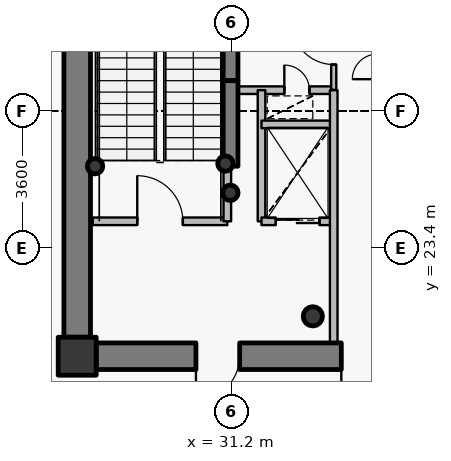
"""IFC4 building model, lengths in metres.
Left out: names, types, materials, properties, quantities, classifications, styles, units other than length and angle.
Written with IfcOpenShell. Run it as: python <this file> out.ifc"""

import sys

from ifc_helpers import new_model, si_unit, direction, frame, frame_2d, origin, origin_2d, place, context, subcontext, project, spatial, rectangle, hollow_circle, extrude, source, transform, mapped, element, fill, save


model = new_model("IFC4")
c1 = context("Model", 3, precision=1e-05, world=origin(), true_north=direction((0.0, 1.0)))
c2 = subcontext(c1, "Body", "Model", "MODEL_VIEW")
j1 = project(units=[si_unit("LENGTHUNIT", "METRE"), si_unit("PLANEANGLEUNIT", "RADIAN")], contexts=[c1])
p1 = place(None, origin())
s1 = spatial("IfcSite", under=j1, at=p1, CompositionType="ELEMENT")
p2 = place(p1, origin())
s2 = spatial("IfcBuilding", under=s1, at=p2, CompositionType="ELEMENT")
p3 = place(p2, frame((0.0, 0.0, 268.2)))
s3 = spatial("IfcBuildingStorey", under=s2, at=p3, CompositionType="ELEMENT", Elevation=268.2)
p4 = place(p3, frame((27.15, 20.55, 0.0), z_axis=(0.0, 0.0, 1.0), x_axis=(1.0, 0.0, 0.0)))
e1 = element("IfcColumn", 1, at=p4, inside=s3, PredefinedType="COLUMN", context=c2, shape_type="SweptSolid", body=[
    extrude(rectangle(XDim=1.0, YDim=1.0, at=origin_2d()), origin(), (0.0, 0.0, 1.0), 4.8),
])
p5 = place(p3, frame((33.35, 21.6, 0.0), z_axis=(0.0, 0.0, 1.0), x_axis=(1.0, 0.0, 0.0)))
e2 = element("IfcColumn", 2, at=p5, inside=s3, PredefinedType="COLUMN", context=c2, shape_type="SweptSolid", body=[
    extrude(hollow_circle(Radius=0.254, WallThickness=0.02, at=origin_2d()), origin(), (0.0, 0.0, 1.0), 4.8),
])
p6 = place(p3, frame((31.18, 27.8, 0.0), z_axis=(0.0, 0.0, 1.0), x_axis=(0.0, 1.0, 0.0)))
e3 = element("IfcWall", 3, at=p6, inside=s3, PredefinedType="SHEAR", context=c2, shape_type="SweptSolid", body=[
    extrude(rectangle(XDim=4.75, YDim=0.4, at=frame_2d((2.375, 0.0))), origin(), (0.0, 0.0, 1.0), 4.8),
])
for number, where, z_axis, x_axis in (
    (4, (31.05, 25.62, 0.0), (0.0, 0.0, 1.0), (1.0, 0.0, 0.0)),
    (5, (31.18, 24.85, 0.0), (0.0, 0.0, 1.0), (1.0, 0.0, 0.0)),
    (6, (27.62, 25.55, 0.0), (0.0, 0.0, 1.0), (1.0, 0.0, 0.0)),
):
    element("IfcColumn", number, at=place(p3, frame(where, z_axis=z_axis, x_axis=x_axis)), inside=s3, PredefinedType="COLUMN", context=c2, shape_type="SweptSolid", body=[
        extrude(hollow_circle(Radius=0.203, WallThickness=0.016, at=origin_2d()), origin(), (0.0, 0.0, 1.0), 4.8),
    ])
p7 = place(p3, frame((44.35, 20.55, 0.0), z_axis=(0.0, 0.0, 1.0), x_axis=(-1.0, 0.0, 0.0)))
e7 = element("IfcWall", 7, at=p7, inside=s3, PredefinedType="SHEAR", context=c2, shape_type="SweptSolid", body=[
    extrude(rectangle(XDim=16.7, YDim=0.7, at=frame_2d((8.35, 0.0))), origin(), (0.0, 0.0, 1.0), 4.1),
])
p8 = place(p7, frame((12.925, 0.0, 0.0)))
e8 = element("IfcOpeningElement", 8, at=p8, cuts=e7, PredefinedType="OPENING", context=c2, shape_type="SweptSolid", body=[
    extrude(rectangle(XDim=1.15, YDim=2.15, at=origin_2d()), frame((0.575, 0.36, 1.075), z_axis=(0.0, -1.0, 0.0), x_axis=(1.0, 0.0, 0.0)), (0.0, 0.0, 1.0), 0.72),
])
p9 = place(p7, frame((9.1, 0.0, 0.0)))
e9 = element("IfcOpeningElement", 9, at=p9, cuts=e7, PredefinedType="OPENING", context=c2, shape_type="SweptSolid", body=[
    extrude(rectangle(XDim=1.15, YDim=2.15, at=origin_2d()), frame((0.575, 0.36, 1.075), z_axis=(0.0, -1.0, 0.0), x_axis=(1.0, 0.0, 0.0)), (0.0, 0.0, 1.0), 0.72),
])
p10 = place(p3, frame((27.15, 21.05, 0.0), z_axis=(0.0, 0.0, 1.0), x_axis=(0.0, 1.0, 0.0)))
e10 = element("IfcWall", 10, at=p10, inside=s3, PredefinedType="SHEAR", context=c2, shape_type="SweptSolid", body=[
    extrude(rectangle(XDim=11.9, YDim=0.7, at=frame_2d((5.95, 0.0))), origin(), (0.0, 0.0, 1.0), 4.1),
])
p11 = place(p3, frame((31.18, 25.55, 0.0), z_axis=(0.0, 0.0, 1.0), x_axis=(0.0, 1.0, 0.0)))
e11 = element("IfcWall", 11, at=p11, inside=s3, PredefinedType="SHEAR", context=c2, shape_type="SweptSolid", body=[
    extrude(rectangle(XDim=2.25, YDim=0.4, at=frame_2d((1.125, 0.0))), origin(), (0.0, 0.0, 1.0), 4.15),
])
p12 = place(p3, frame((27.56, 24.1, 0.0), z_axis=(0.0, 0.0, 1.0), x_axis=(1.0, 0.0, 0.0)))
e12 = element("IfcWall", 12, at=p12, inside=s3, PredefinedType="PARTITIONING", context=c2, shape_type="SweptSolid", body=[
    extrude(rectangle(XDim=3.54, YDim=0.2, at=frame_2d((1.77, 0.0))), origin(), (0.0, 0.0, 1.0), 4.55),
])
p13 = place(p12, frame((1.17, 0.0, 0.0)))
e13 = element("IfcOpeningElement", 13, at=p13, cuts=e12, PredefinedType="OPENING", context=c2, shape_type="SweptSolid", body=[
    extrude(rectangle(XDim=1.2, YDim=2.15, at=origin_2d()), frame((0.6, 0.11, 1.075), z_axis=(0.0, -1.0, 0.0), x_axis=(1.0, 0.0, 0.0)), (0.0, 0.0, 1.0), 0.22),
])
p14 = place(p3, frame((31.1, 24.1, 0.0), z_axis=(0.0, 0.0, 1.0), x_axis=(0.0, 1.0, 0.0)))
e14 = element("IfcWall", 14, at=p14, inside=s3, PredefinedType="PARTITIONING", context=c2, shape_type="SweptSolid", body=[
    extrude(rectangle(XDim=1.44, YDim=0.2, at=frame_2d((0.72, 0.0))), origin(), (0.0, 0.0, 1.0), 4.55),
])
p15 = place(p3, frame((31.1, 27.55, 0.0), z_axis=(0.0, 0.0, 1.0), x_axis=(1.0, 0.0, 0.0)))
e15 = element("IfcWall", 15, at=p15, inside=s3, PredefinedType="PARTITIONING", context=c2, shape_type="SweptSolid", body=[
    extrude(rectangle(XDim=2.8, YDim=0.2, at=frame_2d((1.4, 0.0))), origin(), (0.0, 0.0, 1.0), 4.135),
])
p16 = place(p15, frame((1.5, 0.0, 0.0)))
e16 = element("IfcOpeningElement", 16, at=p16, cuts=e15, PredefinedType="OPENING", context=c2, shape_type="SweptSolid", body=[
    extrude(rectangle(XDim=0.66, YDim=2.05, at=origin_2d()), frame((0.33, 0.11, 1.025), z_axis=(0.0, -1.0, 0.0), x_axis=(1.0, 0.0, 0.0)), (0.0, 0.0, 1.0), 0.22),
])
p17 = place(p3, frame((32.0, 24.1, 0.0), z_axis=(0.0, 0.0, 1.0), x_axis=(0.0, 1.0, 0.0)))
e17 = element("IfcWall", 17, at=p17, inside=s3, PredefinedType="PARTITIONING", context=c2, shape_type="SweptSolid", body=[
    extrude(rectangle(XDim=3.45, YDim=0.2, at=frame_2d((1.725, 0.0))), origin(), (0.0, 0.0, 1.0), 4.55),
])
p18 = place(p3, frame((32.0, 24.1, 0.0), z_axis=(0.0, 0.0, 1.0), x_axis=(1.0, 0.0, 0.0)))
e18 = element("IfcWall", 18, at=p18, inside=s3, PredefinedType="PARTITIONING", context=c2, shape_type="SweptSolid", body=[
    extrude(rectangle(XDim=1.9, YDim=0.2, at=frame_2d((0.95, 0.0))), origin(), (0.0, 0.0, 1.0), 4.135),
])
p19 = place(p18, frame((0.375, 0.0, 0.0)))
e19 = element("IfcOpeningElement", 19, at=p19, cuts=e18, PredefinedType="OPENING", context=c2, shape_type="SweptSolid", body=[
    extrude(rectangle(XDim=1.15, YDim=2.15, at=origin_2d()), frame((0.575, 0.11, 1.075), z_axis=(0.0, -1.0, 0.0), x_axis=(1.0, 0.0, 0.0)), (0.0, 0.0, 1.0), 0.22),
])
p20 = place(p3, frame((32.0, 26.65, 0.0), z_axis=(0.0, 0.0, 1.0), x_axis=(1.0, 0.0, 0.0)))
e20 = element("IfcWall", 20, at=p20, inside=s3, PredefinedType="PARTITIONING", context=c2, shape_type="SweptSolid", body=[
    extrude(rectangle(XDim=1.9, YDim=0.2, at=frame_2d((0.95, 0.0))), origin(), (0.0, 0.0, 1.0), 4.135),
])
p21 = place(p3, frame((33.9, 20.9, 0.0), z_axis=(0.0, 0.0, 1.0), x_axis=(0.0, 1.0, 0.0)))
e21 = element("IfcWall", 21, at=p21, inside=s3, PredefinedType="PARTITIONING", context=c2, shape_type="SweptSolid", body=[
    extrude(rectangle(XDim=6.65, YDim=0.2, at=frame_2d((3.325, 0.0))), origin(), (0.0, 0.0, 1.0), 4.135),
])
p22 = place(p3, frame((33.9, 27.56, 0.0), z_axis=(0.0, 0.0, 1.0), x_axis=(0.0, 1.0, 0.0)))
e22 = element("IfcWall", 22, at=p22, inside=s3, PredefinedType="PARTITIONING", context=c2, shape_type="SweptSolid", body=[
    extrude(rectangle(XDim=5.54, YDim=0.135, at=frame_2d((2.77, 0.0))), origin(), (0.0, 0.0, 1.0), 4.135),
])
p23 = place(p22, frame((0.665, 0.0, 0.0)))
e23 = element("IfcOpeningElement", 23, at=p23, cuts=e22, PredefinedType="OPENING", context=c2, shape_type="SweptSolid", body=[
    extrude(rectangle(XDim=1.1, YDim=2.15, at=origin_2d()), frame((0.55, 0.078, 1.075), z_axis=(0.0, -1.0, 0.0), x_axis=(1.0, 0.0, 0.0)), (0.0, 0.0, 1.0), 0.155),
])
p24 = place(p22, frame((3.117, 0.0, 0.0)))
e24 = element("IfcOpeningElement", 24, at=p24, cuts=e22, PredefinedType="OPENING", context=c2, shape_type="SweptSolid", body=[
    extrude(rectangle(XDim=1.1, YDim=2.15, at=origin_2d()), frame((0.55, 0.078, 1.075), z_axis=(0.0, -1.0, 0.0), x_axis=(1.0, 0.0, 0.0)), (0.0, 0.0, 1.0), 0.155),
])
p25 = place(p3, frame((26.8, 21.04, 0.0), z_axis=(0.0, 0.0, 1.0), x_axis=(0.0, -1.0, 0.0)))
e25 = element("IfcWall", 25, at=p25, inside=s3, PredefinedType="PARTITIONING", context=c2, shape_type="SweptSolid", body=[
    extrude(rectangle(XDim=0.84, YDim=0.135, at=frame_2d((0.42, 0.0))), origin(), (0.0, 0.0, 1.0), 4.085),
])
p26 = place(p3, frame((27.107, 20.2, 0.0), z_axis=(0.0, 0.0, 1.0), x_axis=(1.0, 0.0, 0.0)))
e26 = element("IfcWall", 26, at=p26, inside=s3, PredefinedType="PARTITIONING", context=c2, shape_type="SweptSolid", body=[
    extrude(rectangle(XDim=0.532, YDim=0.135, at=frame_2d((0.266, 0.0))), origin(), (0.0, 0.0, 1.0), 4.085),
])
m1 = source(origin(), c2, "Body", "SweptSolid", [
    extrude(rectangle(XDim=1.15, YDim=2.15, at=origin_2d()), frame((0.575, 0.025, 1.075), z_axis=(0.0, -1.0, 0.0), x_axis=(1.0, 0.0, 0.0)), (0.0, 0.0, 1.0), 0.05),
])
p27 = place(p8, origin())
e27 = element("IfcDoor", 27, at=p27, inside=s3, OperationType="SINGLE_SWING_RIGHT", PredefinedType="DOOR", context=c2, shape_type="MappedRepresentation", body=[
    mapped(m1, transform((0.0, 0.0, 0.0), x_axis=(1.0, 0.0, 0.0), y_axis=(0.0, 1.0, 0.0), z_axis=(0.0, 0.0, 1.0), scale=1.0)),
])
fill(e8, e27)
p28 = place(p9, origin())
e28 = element("IfcDoor", 28, at=p28, inside=s3, OperationType="SINGLE_SWING_RIGHT", PredefinedType="DOOR", context=c2, shape_type="MappedRepresentation", body=[
    mapped(m1, transform((0.0, 0.0, 0.0), x_axis=(1.0, 0.0, 0.0), y_axis=(0.0, 1.0, 0.0), z_axis=(0.0, 0.0, 1.0), scale=1.0)),
])
fill(e9, e28)
m2 = source(origin(), c2, "Body", "SweptSolid", [
    extrude(rectangle(XDim=1.2, YDim=2.15, at=origin_2d()), frame((0.6, 0.025, 1.075), z_axis=(0.0, -1.0, 0.0), x_axis=(1.0, 0.0, 0.0)), (0.0, 0.0, 1.0), 0.05),
])
p29 = place(p13, origin())
e29 = element("IfcDoor", 29, at=p29, inside=s3, OperationType="SINGLE_SWING_LEFT", PredefinedType="DOOR", context=c2, shape_type="MappedRepresentation", body=[
    mapped(m2, transform((0.0, 0.0, 0.0), x_axis=(1.0, 0.0, 0.0), y_axis=(0.0, 1.0, 0.0), z_axis=(0.0, 0.0, 1.0), scale=1.0)),
])
fill(e13, e29)
m3 = source(origin(), c2, "Body", "SweptSolid", [
    extrude(rectangle(XDim=1.15, YDim=2.15, at=origin_2d()), frame((0.575, 0.025, 1.075), z_axis=(0.0, -1.0, 0.0), x_axis=(1.0, 0.0, 0.0)), (0.0, 0.0, 1.0), 0.05),
])
p30 = place(p19, origin())
e30 = element("IfcDoor", 30, at=p30, inside=s3, OperationType="DOUBLE_DOOR_SLIDING", PredefinedType="USERDEFINED", context=c2, shape_type="MappedRepresentation", body=[
    mapped(m3, transform((0.0, 0.0, 0.0), x_axis=(1.0, 0.0, 0.0), y_axis=(0.0, 1.0, 0.0), z_axis=(0.0, 0.0, 1.0), scale=1.0)),
])
fill(e19, e30)
m4 = source(origin(), c2, "Body", "SweptSolid", [
    extrude(rectangle(XDim=1.1, YDim=2.15, at=origin_2d()), frame((0.55, 0.025, 1.075), z_axis=(0.0, -1.0, 0.0), x_axis=(1.0, 0.0, 0.0)), (0.0, 0.0, 1.0), 0.05),
])
p31 = place(p23, origin())
e31 = element("IfcDoor", 31, at=p31, inside=s3, OperationType="SINGLE_SWING_RIGHT", PredefinedType="DOOR", context=c2, shape_type="MappedRepresentation", body=[
    mapped(m4, transform((0.0, 0.0, 0.0), x_axis=(1.0, 0.0, 0.0), y_axis=(0.0, 1.0, 0.0), z_axis=(0.0, 0.0, 1.0), scale=1.0)),
])
fill(e23, e31)
m5 = source(origin(), c2, "Body", "SweptSolid", [
    extrude(rectangle(XDim=0.66, YDim=2.05, at=origin_2d()), frame((0.33, 0.025, 1.025), z_axis=(0.0, -1.0, 0.0), x_axis=(1.0, 0.0, 0.0)), (0.0, 0.0, 1.0), 0.05),
])
p32 = place(p16, origin())
e32 = element("IfcDoor", 32, at=p32, inside=s3, OperationType="SINGLE_SWING_LEFT", PredefinedType="USERDEFINED", context=c2, shape_type="MappedRepresentation", body=[
    mapped(m5, transform((0.0, 0.0, 0.0), x_axis=(1.0, 0.0, 0.0), y_axis=(0.0, 1.0, 0.0), z_axis=(0.0, 0.0, 1.0), scale=1.0)),
])
fill(e16, e32)
save(model, sys.argv[1])
